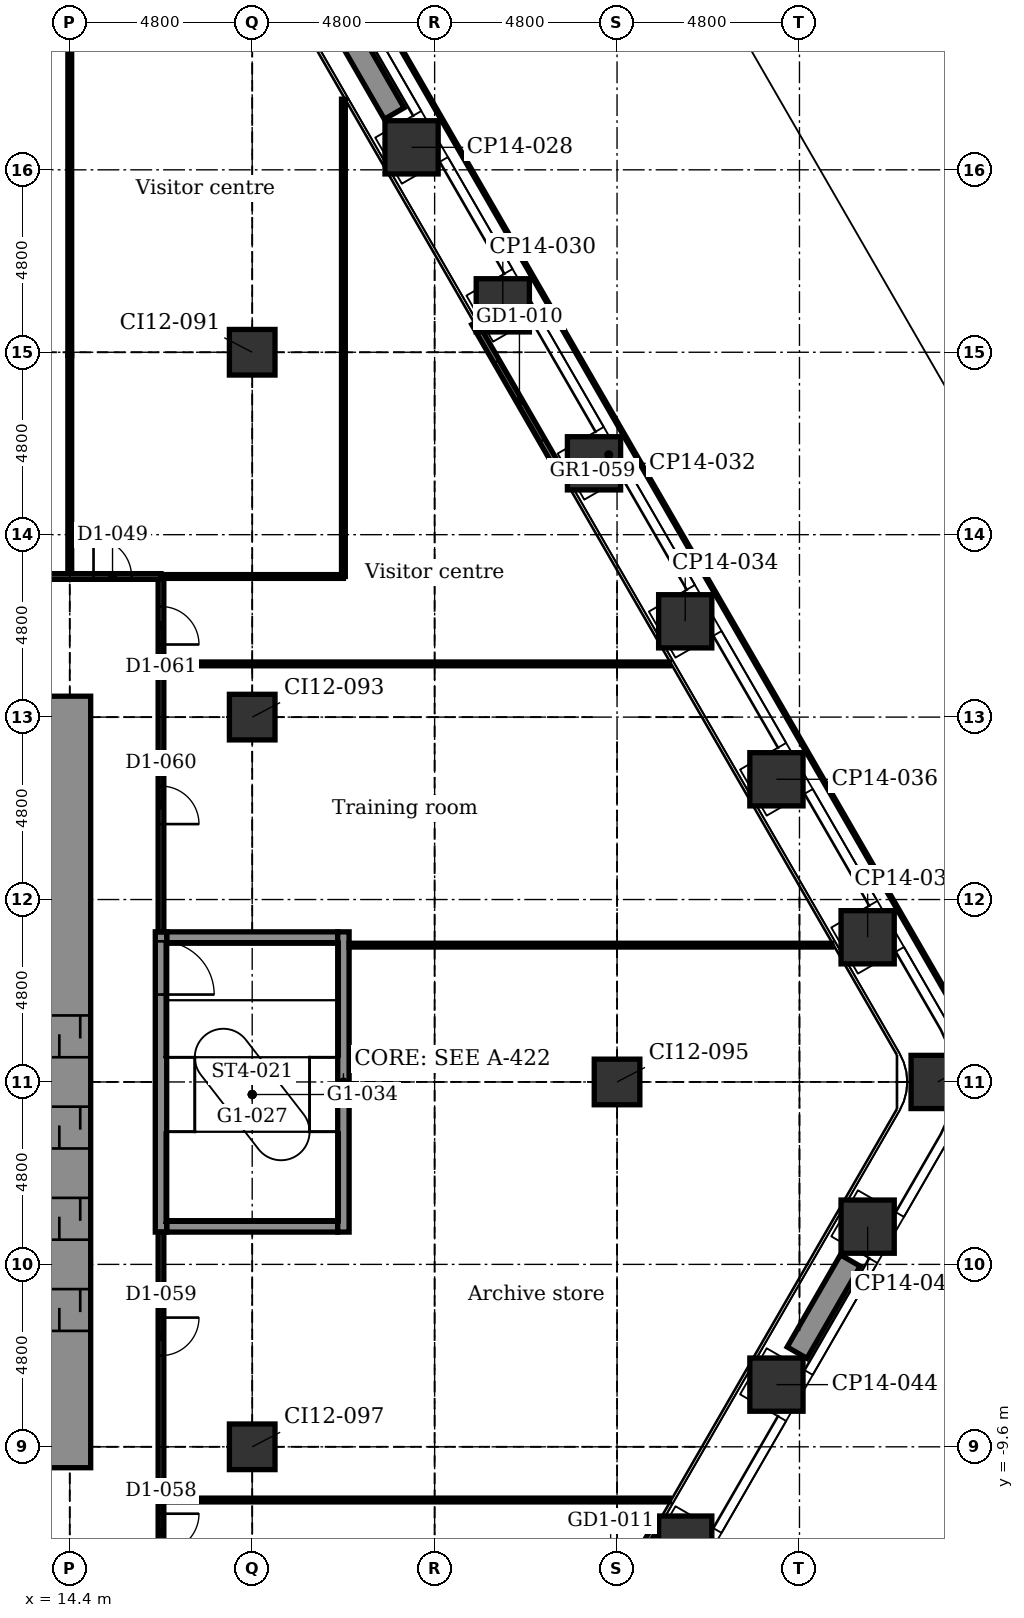
"""IFC4 building model, lengths in metres.
Left out: names, types, materials, properties, quantities, classifications, styles, units other than length and angle.
Written with IfcOpenShell. Run it as: python <this file> out.ifc"""

import sys

from ifc_helpers import new_model, si_unit, direction, frame, frame_2d, origin, origin_2d, place, context, subcontext, project, spatial, rectangle, extrude, element, fill, save


model = new_model("IFC4")
c1 = context("Model", 3, precision=1e-05, world=origin(), true_north=direction((0.0, 1.0)))
c2 = subcontext(c1, "Body", "Model", "MODEL_VIEW")
j1 = project(units=[si_unit("LENGTHUNIT", "METRE"), si_unit("PLANEANGLEUNIT", "RADIAN")], contexts=[c1])
p1 = place(None, origin())
s1 = spatial("IfcSite", under=j1, at=p1, CompositionType="ELEMENT")
p2 = place(p1, origin())
s2 = spatial("IfcBuilding", under=s1, at=p2, CompositionType="ELEMENT")
p3 = place(p2, frame((0.0, 0.0, 17.4)))
s3 = spatial("IfcBuildingStorey", under=s2, at=p3, CompositionType="ELEMENT", Elevation=17.4)
for number, where, z_axis, x_axis in (
    (1, (23.394, 24.592, -0.25), (0.0, 0.0, 1.0), (0.866, 0.5, 0.0)),
    (2, (25.794, 20.435, -0.25), (0.0, 0.0, 1.0), (0.866, 0.5, 0.0)),
    (3, (28.194, 16.278, -0.25), (0.0, 0.0, 1.0), (0.866, 0.5, 0.0)),
    (4, (30.594, 12.121, -0.25), (0.0, 0.0, 1.0), (0.866, 0.5, 0.0)),
    (5, (32.994, 7.964, -0.25), (0.0, 0.0, 1.0), (0.866, 0.5, 0.0)),
    (6, (35.394, 3.807, -0.25), (0.0, 0.0, 1.0), (0.866, 0.5, 0.0)),
    (7, (37.236, 0.0, -0.25), (0.0, 0.0, 1.0), (1.0, 0.0, 0.0)),
    (8, (35.394, -3.807, -0.25), (0.0, 0.0, 1.0), (0.5, 0.866, 0.0)),
    (9, (32.994, -7.964, -0.25), (0.0, 0.0, 1.0), (0.5, 0.866, 0.0)),
    (10, (30.594, -12.121, -0.25), (0.0, 0.0, 1.0), (0.5, 0.866, 0.0)),
):
    element("IfcColumn", number, at=place(p3, frame(where, z_axis=z_axis, x_axis=x_axis)), inside=s3, PredefinedType="COLUMN", context=c2, shape_type="SweptSolid", body=[
        extrude(rectangle(XDim=1.4, YDim=1.4, at=origin_2d()), origin(), (0.0, 0.0, 1.0), 5.0),
    ])
for number, where, z_axis, x_axis in (
    (11, (19.2, -9.6, -0.25), (0.0, 0.0, 1.0), (1.0, 0.0, 0.0)),
    (12, (19.2, 9.6, -0.25), (0.0, 0.0, 1.0), (1.0, 0.0, 0.0)),
    (13, (19.2, 19.2, -0.25), (0.0, 0.0, 1.0), (1.0, 0.0, 0.0)),
    (14, (28.8, 0.0, -0.25), (0.0, 0.0, 1.0), (1.0, 0.0, 0.0)),
):
    element("IfcColumn", number, at=place(p3, frame(where, z_axis=z_axis, x_axis=x_axis)), inside=s3, PredefinedType="COLUMN", context=c2, shape_type="SweptSolid", body=[
        extrude(rectangle(XDim=1.2, YDim=1.2, at=origin_2d()), origin(), (0.0, 0.0, 1.0), 5.0),
    ])
for number, where, z_axis, x_axis in (
    (15, (16.95, -3.8, -0.25), (0.0, 0.0, 1.0), (1.0, 0.0, 0.0)),
    (16, (16.95, 3.8, -0.25), (0.0, 0.0, 1.0), (1.0, 0.0, 0.0)),
):
    element("IfcWall", number, at=place(p3, frame(where, z_axis=z_axis, x_axis=x_axis)), inside=s3, PredefinedType="STANDARD", context=c2, shape_type="SweptSolid", body=[
        extrude(rectangle(XDim=4.5, YDim=0.3, at=frame_2d((2.25, 0.0))), origin(), (0.0, 0.0, 1.0), 5.0),
    ])
p4 = place(p3, frame((14.4, -10.15, -0.25), z_axis=(0.0, 0.0, 1.0), x_axis=(0.0, 1.0, 0.0)))
e17 = element("IfcWall", 17, at=p4, inside=s3, PredefinedType="SHEAR", context=c2, shape_type="SweptSolid", body=[
    extrude(rectangle(XDim=20.3, YDim=1.1, at=frame_2d((10.15, 0.0))), origin(), (0.0, 0.0, 1.0), 5.0),
])
p5 = place(p4, frame((3.6, 0.0, 0.25)))
e18 = element("IfcOpeningElement", 18, at=p5, cuts=e17, PredefinedType="OPENING", context=c2, shape_type="SweptSolid", body=[
    extrude(rectangle(XDim=1.1, YDim=2.1, at=frame_2d((0.55, 1.05))), frame((0.0, 0.56, 0.0), z_axis=(0.0, -1.0, 0.0), x_axis=(1.0, 0.0, 0.0)), (0.0, 0.0, 1.0), 1.12),
])
p6 = place(p4, frame((6.0, 0.0, 0.25)))
e19 = element("IfcOpeningElement", 19, at=p6, cuts=e17, PredefinedType="OPENING", context=c2, shape_type="SweptSolid", body=[
    extrude(rectangle(XDim=1.1, YDim=2.1, at=frame_2d((0.55, 1.05))), frame((0.0, 0.56, 0.0), z_axis=(0.0, -1.0, 0.0), x_axis=(1.0, 0.0, 0.0)), (0.0, 0.0, 1.0), 1.12),
])
p7 = place(p4, frame((8.4, 0.0, 0.25)))
e20 = element("IfcOpeningElement", 20, at=p7, cuts=e17, PredefinedType="OPENING", context=c2, shape_type="SweptSolid", body=[
    extrude(rectangle(XDim=1.1, YDim=2.1, at=frame_2d((0.55, 1.05))), frame((0.0, 0.56, 0.0), z_axis=(0.0, -1.0, 0.0), x_axis=(1.0, 0.0, 0.0)), (0.0, 0.0, 1.0), 1.12),
])
p8 = place(p4, frame((10.8, 0.0, 0.25)))
e21 = element("IfcOpeningElement", 21, at=p8, cuts=e17, PredefinedType="OPENING", context=c2, shape_type="SweptSolid", body=[
    extrude(rectangle(XDim=1.1, YDim=2.1, at=frame_2d((0.55, 1.05))), frame((0.0, 0.56, 0.0), z_axis=(0.0, -1.0, 0.0), x_axis=(1.0, 0.0, 0.0)), (0.0, 0.0, 1.0), 1.12),
])
p9 = place(p3, frame((16.8, -3.95, -0.25), z_axis=(0.0, 0.0, 1.0), x_axis=(0.0, 1.0, 0.0)))
e22 = element("IfcWall", 22, at=p9, inside=s3, PredefinedType="STANDARD", context=c2, shape_type="SweptSolid", body=[
    extrude(rectangle(XDim=7.9, YDim=0.3, at=frame_2d((3.95, 0.0))), origin(), (0.0, 0.0, 1.0), 5.0),
])
p10 = place(p9, frame((6.25, 0.0, 0.25)))
e23 = element("IfcOpeningElement", 23, at=p10, cuts=e22, PredefinedType="OPENING", context=c2, shape_type="SweptSolid", body=[
    extrude(rectangle(XDim=1.4, YDim=2.1, at=frame_2d((0.7, 1.05))), frame((0.0, 0.16, 0.0), z_axis=(0.0, -1.0, 0.0), x_axis=(1.0, 0.0, 0.0)), (0.0, 0.0, 1.0), 0.32),
])
p11 = place(p3, frame((21.6, -3.95, -0.25), z_axis=(0.0, 0.0, 1.0), x_axis=(0.0, 1.0, 0.0)))
e24 = element("IfcWall", 24, at=p11, inside=s3, PredefinedType="STANDARD", context=c2, shape_type="SweptSolid", body=[
    extrude(rectangle(XDim=7.9, YDim=0.3, at=frame_2d((3.95, 0.0))), origin(), (0.0, 0.0, 1.0), 5.0),
])
p12 = place(p3, frame((25.047, 19.969, 0.0), z_axis=(0.0, 0.0, 1.0), x_axis=(0.5000167099, -0.866015756104, 0.0)))
e25 = element("IfcWall", 25, at=p12, inside=s3, PredefinedType="PARTITIONING", context=c2, shape_type="SweptSolid", body=[
    extrude(rectangle(XDim=4.74, YDim=0.16, at=frame_2d((2.37, 0.0))), origin(), (0.0, 0.0, 1.0), 4.75),
])
p13 = place(p12, frame((1.17, 0.0, 0.0)))
e26 = element("IfcOpeningElement", 26, at=p13, cuts=e25, PredefinedType="OPENING", context=c2, shape_type="SweptSolid", body=[
    extrude(rectangle(XDim=2.4, YDim=2.4, at=frame_2d((1.2, 1.2))), frame((0.0, 0.09, 0.0), z_axis=(0.0, -1.0, 0.0), x_axis=(1.0, 0.0, 0.0)), (0.0, 0.0, 1.0), 0.18),
])
p14 = place(p3, frame((29.817, -11.707, 0.0), z_axis=(0.0, 0.0, 1.0), x_axis=(-0.499978080042, -0.866038058908, 0.0)))
e27 = element("IfcWall", 27, at=p14, inside=s3, PredefinedType="PARTITIONING", context=c2, shape_type="SweptSolid", body=[
    extrude(rectangle(XDim=4.74, YDim=0.16, at=frame_2d((2.37, 0.0))), origin(), (0.0, 0.0, 1.0), 4.75),
])
p15 = place(p14, frame((1.17, 0.0, 0.0)))
e28 = element("IfcOpeningElement", 28, at=p15, cuts=e27, PredefinedType="OPENING", context=c2, shape_type="SweptSolid", body=[
    extrude(rectangle(XDim=2.4, YDim=2.4, at=frame_2d((1.2, 1.2))), frame((0.0, 0.09, 0.0), z_axis=(0.0, -1.0, 0.0), x_axis=(1.0, 0.0, 0.0)), (0.0, 0.0, 1.0), 0.18),
])
for number, where, z_axis, x_axis in (
    (29, (21.537, 27.907, 0.0), (0.0, 0.0, 1.0), (0.5, -0.866, 0.0)),
    (30, (34.937, -4.698, 0.0), (0.0, 0.0, 1.0), (-0.5, -0.866, 0.0)),
):
    element("IfcWall", number, at=place(p3, frame(where, z_axis=z_axis, x_axis=x_axis)), inside=s3, PredefinedType="USERDEFINED", context=c2, shape_type="SweptSolid", body=[
        extrude(rectangle(XDim=2.8, YDim=0.6, at=frame_2d((1.4, 0.0))), origin(), (0.0, 0.0, 1.0), 0.7),
    ])
p16 = place(p3, frame((21.6, 13.3, 0.0), z_axis=(0.0, 0.0, 1.0), x_axis=(0.0, 1.0, 0.0)))
e31 = element("IfcWall", 31, at=p16, inside=s3, PredefinedType="PARTITIONING", context=c2, shape_type="SweptSolid", body=[
    extrude(rectangle(XDim=12.558, YDim=0.1, at=frame_2d((6.279, 0.0))), origin(), (0.0, 0.0, 1.0), 4.75),
])
p17 = place(p3, frame((16.8, -13.0, 0.0), z_axis=(0.0, 0.0, 1.0), x_axis=(0.0, 1.0, 0.0)))
e32 = element("IfcWall", 32, at=p17, inside=s3, PredefinedType="PARTITIONING", context=c2, shape_type="SweptSolid", body=[
    extrude(rectangle(XDim=9.05, YDim=0.15, at=frame_2d((4.525, 0.0))), origin(), (0.0, 0.0, 1.0), 4.75),
])
p18 = place(p17, frame((0.64, 0.0, 0.0)))
e33 = element("IfcOpeningElement", 33, at=p18, cuts=e32, PredefinedType="OPENING", context=c2, shape_type="SweptSolid", body=[
    extrude(rectangle(XDim=1.0, YDim=2.1, at=frame_2d((0.5, 1.05))), frame((0.0, 0.085, 0.0), z_axis=(0.0, -1.0, 0.0), x_axis=(1.0, 0.0, 0.0)), (0.0, 0.0, 1.0), 0.17),
])
p19 = place(p17, frame((5.8, 0.0, 0.0)))
e34 = element("IfcOpeningElement", 34, at=p19, cuts=e32, PredefinedType="OPENING", context=c2, shape_type="SweptSolid", body=[
    extrude(rectangle(XDim=1.0, YDim=2.1, at=frame_2d((0.5, 1.05))), frame((0.0, 0.085, 0.0), z_axis=(0.0, -1.0, 0.0), x_axis=(1.0, 0.0, 0.0)), (0.0, 0.0, 1.0), 0.17),
])
p20 = place(p3, frame((16.8, 3.95, 0.0), z_axis=(0.0, 0.0, 1.0), x_axis=(0.0, 1.0, 0.0)))
e35 = element("IfcWall", 35, at=p20, inside=s3, PredefinedType="PARTITIONING", context=c2, shape_type="SweptSolid", body=[
    extrude(rectangle(XDim=9.35, YDim=0.15, at=frame_2d((4.675, 0.0))), origin(), (0.0, 0.0, 1.0), 4.75),
])
p21 = place(p20, frame((2.835, 0.0, 0.0)))
e36 = element("IfcOpeningElement", 36, at=p21, cuts=e35, PredefinedType="OPENING", context=c2, shape_type="SweptSolid", body=[
    extrude(rectangle(XDim=1.0, YDim=2.1, at=frame_2d((0.5, 1.05))), frame((0.0, 0.085, 0.0), z_axis=(0.0, -1.0, 0.0), x_axis=(1.0, 0.0, 0.0)), (0.0, 0.0, 1.0), 0.17),
])
p22 = place(p20, frame((7.56, 0.0, 0.0)))
e37 = element("IfcOpeningElement", 37, at=p22, cuts=e35, PredefinedType="OPENING", context=c2, shape_type="SweptSolid", body=[
    extrude(rectangle(XDim=1.0, YDim=2.1, at=frame_2d((0.5, 1.05))), frame((0.0, 0.085, 0.0), z_axis=(0.0, -1.0, 0.0), x_axis=(1.0, 0.0, 0.0)), (0.0, 0.0, 1.0), 0.17),
])
p23 = place(p3, frame((14.4, 19.113, 0.0), z_axis=(0.0, 0.0, 1.0), x_axis=(0.0, 1.0, 0.0)))
e38 = element("IfcWall", 38, at=p23, inside=s3, PredefinedType="PARTITIONING", context=c2, shape_type="SweptSolid", body=[
    extrude(rectangle(XDim=12.472, YDim=0.1, at=frame_2d((6.236, 0.0))), origin(), (0.0, 0.0, 1.0), 4.066),
])
p24 = place(p3, frame((14.4, 13.3, 0.0), z_axis=(0.0, 0.0, 1.0), x_axis=(0.0, 1.0, 0.0)))
e39 = element("IfcWall", 39, at=p24, inside=s3, PredefinedType="PARTITIONING", context=c2, shape_type="SweptSolid", body=[
    extrude(rectangle(XDim=5.813, YDim=0.1, at=frame_2d((2.906, 0.0))), origin(), (0.0, 0.0, 1.0), 4.293),
])
p25 = place(p3, frame((16.8, -11.0, 0.0), z_axis=(0.0, 0.0, 1.0), x_axis=(1.0, 0.0, 0.0)))
e40 = element("IfcWall", 40, at=p25, inside=s3, PredefinedType="PARTITIONING", context=c2, shape_type="SweptSolid", body=[
    extrude(rectangle(XDim=13.378, YDim=0.1, at=frame_2d((6.689, 0.0))), origin(), (0.0, 0.0, 1.0), 4.75),
])
p26 = place(p3, frame((21.75, 3.6, 0.0), z_axis=(0.0, 0.0, 1.0), x_axis=(1.0, 0.0, 0.0)))
e41 = element("IfcWall", 41, at=p26, inside=s3, PredefinedType="PARTITIONING", context=c2, shape_type="SweptSolid", body=[
    extrude(rectangle(XDim=12.701, YDim=0.1, at=frame_2d((6.351, 0.0))), origin(), (0.0, 0.0, 1.0), 4.75),
])
p27 = place(p3, frame((16.8, 11.0, 0.0), z_axis=(0.0, 0.0, 1.0), x_axis=(1.0, 0.0, 0.0)))
e42 = element("IfcWall", 42, at=p27, inside=s3, PredefinedType="PARTITIONING", context=c2, shape_type="SweptSolid", body=[
    extrude(rectangle(XDim=13.378, YDim=0.1, at=frame_2d((6.689, 0.0))), origin(), (0.0, 0.0, 1.0), 4.75),
])
p28 = place(p3, frame((16.8, 13.3, 0.0), z_axis=(0.0, 0.0, 1.0), x_axis=(1.0, 0.0, 0.0)))
e43 = element("IfcWall", 43, at=p28, inside=s3, PredefinedType="PARTITIONING", context=c2, shape_type="SweptSolid", body=[
    extrude(rectangle(XDim=4.8, YDim=0.1, at=frame_2d((2.4, 0.0))), origin(), (0.0, 0.0, 1.0), 4.75),
])
p29 = place(p3, frame((-16.8, 13.3, 0.0), z_axis=(0.0, 0.0, 1.0), x_axis=(1.0, 0.0, 0.0)))
e44 = element("IfcWall", 44, at=p29, inside=s3, PredefinedType="PARTITIONING", context=c2, shape_type="SweptSolid", body=[
    extrude(rectangle(XDim=33.6, YDim=0.15, at=frame_2d((16.8, 0.0))), origin(), (0.0, 0.0, 1.0), 4.75),
])
p30 = place(p29, frame((1.9, 0.0, 0.0)))
e45 = element("IfcOpeningElement", 45, at=p30, cuts=e44, PredefinedType="OPENING", context=c2, shape_type="SweptSolid", body=[
    extrude(rectangle(XDim=1.0, YDim=2.1, at=frame_2d((0.5, 1.05))), frame((0.0, 0.085, 0.0), z_axis=(0.0, -1.0, 0.0), x_axis=(1.0, 0.0, 0.0)), (0.0, 0.0, 1.0), 0.17),
])
p31 = place(p29, frame((5.375, 0.0, 0.0)))
e46 = element("IfcOpeningElement", 46, at=p31, cuts=e44, PredefinedType="OPENING", context=c2, shape_type="SweptSolid", body=[
    extrude(rectangle(XDim=1.0, YDim=2.1, at=frame_2d((0.5, 1.05))), frame((0.0, 0.085, 0.0), z_axis=(0.0, -1.0, 0.0), x_axis=(1.0, 0.0, 0.0)), (0.0, 0.0, 1.0), 0.17),
])
p32 = place(p29, frame((9.825, 0.0, 0.0)))
e47 = element("IfcOpeningElement", 47, at=p32, cuts=e44, PredefinedType="OPENING", context=c2, shape_type="SweptSolid", body=[
    extrude(rectangle(XDim=1.0, YDim=2.1, at=frame_2d((0.5, 1.05))), frame((0.0, 0.085, 0.0), z_axis=(0.0, -1.0, 0.0), x_axis=(1.0, 0.0, 0.0)), (0.0, 0.0, 1.0), 0.17),
])
p33 = place(p29, frame((14.335, 0.0, 0.0)))
e48 = element("IfcOpeningElement", 48, at=p33, cuts=e44, PredefinedType="OPENING", context=c2, shape_type="SweptSolid", body=[
    extrude(rectangle(XDim=1.0, YDim=2.1, at=frame_2d((0.5, 1.05))), frame((0.0, 0.085, 0.0), z_axis=(0.0, -1.0, 0.0), x_axis=(1.0, 0.0, 0.0)), (0.0, 0.0, 1.0), 0.17),
])
p34 = place(p29, frame((18.185, 0.0, 0.0)))
e49 = element("IfcOpeningElement", 49, at=p34, cuts=e44, PredefinedType="OPENING", context=c2, shape_type="SweptSolid", body=[
    extrude(rectangle(XDim=1.0, YDim=2.1, at=frame_2d((0.5, 1.05))), frame((0.0, 0.085, 0.0), z_axis=(0.0, -1.0, 0.0), x_axis=(1.0, 0.0, 0.0)), (0.0, 0.0, 1.0), 0.17),
])
p35 = place(p29, frame((27.575, 0.0, 0.0)))
e50 = element("IfcOpeningElement", 50, at=p35, cuts=e44, PredefinedType="OPENING", context=c2, shape_type="SweptSolid", body=[
    extrude(rectangle(XDim=1.0, YDim=2.1, at=frame_2d((0.5, 1.05))), frame((0.0, 0.085, 0.0), z_axis=(0.0, -1.0, 0.0), x_axis=(1.0, 0.0, 0.0)), (0.0, 0.0, 1.0), 0.17),
])
p36 = place(p29, frame((31.825, 0.0, 0.0)))
e51 = element("IfcOpeningElement", 51, at=p36, cuts=e44, PredefinedType="OPENING", context=c2, shape_type="SweptSolid", body=[
    extrude(rectangle(XDim=1.0, YDim=2.1, at=frame_2d((0.5, 1.05))), frame((0.0, 0.085, 0.0), z_axis=(0.0, -1.0, 0.0), x_axis=(1.0, 0.0, 0.0)), (0.0, 0.0, 1.0), 0.17),
])
p37 = place(p29, frame((23.55, 0.0, 0.0)))
e52 = element("IfcOpeningElement", 52, at=p37, cuts=e44, PredefinedType="OPENING", context=c2, shape_type="SweptSolid", body=[
    extrude(rectangle(XDim=0.9, YDim=2.1, at=frame_2d((0.45, 1.05))), frame((0.0, 0.085, 0.0), z_axis=(0.0, -1.0, 0.0), x_axis=(1.0, 0.0, 0.0)), (0.0, 0.0, 1.0), 0.17),
])
p38 = place(p29, frame((20.55, 0.0, 0.0)))
e53 = element("IfcOpeningElement", 53, at=p38, cuts=e44, PredefinedType="OPENING", context=c2, shape_type="SweptSolid", body=[
    extrude(rectangle(XDim=0.9, YDim=2.1, at=frame_2d((0.45, 1.05))), frame((0.0, 0.085, 0.0), z_axis=(0.0, -1.0, 0.0), x_axis=(1.0, 0.0, 0.0)), (0.0, 0.0, 1.0), 0.17),
])
p39 = place(p13, origin())
e54 = element("IfcDoor", 54, at=p39, inside=s3, OperationType="DOUBLE_DOOR_SLIDING", PredefinedType="DOOR", context=c2, shape_type="SweptSolid", body=[
    extrude(rectangle(XDim=2.4, YDim=2.4, at=frame_2d((1.2, 1.2))), frame((0.0, 0.025, 0.0), z_axis=(0.0, -1.0, 0.0), x_axis=(1.0, 0.0, 0.0)), (0.0, 0.0, 1.0), 0.05),
])
fill(e26, e54)
p40 = place(p36, origin())
e55 = element("IfcDoor", 55, at=p40, inside=s3, OperationType="SINGLE_SWING_LEFT", PredefinedType="DOOR", context=c2, shape_type="SweptSolid", body=[
    extrude(rectangle(XDim=1.0, YDim=2.1, at=frame_2d((0.5, 1.05))), frame((0.0, 0.025, 0.0), z_axis=(0.0, -1.0, 0.0), x_axis=(1.0, 0.0, 0.0)), (0.0, 0.0, 1.0), 0.05),
])
fill(e51, e55)
p41 = place(p18, frame((1.0, 0.0, 0.0), z_axis=(0.0, 0.0, 1.0), x_axis=(-1.0, 0.0, 0.0)))
e56 = element("IfcDoor", 56, at=p41, inside=s3, OperationType="SINGLE_SWING_RIGHT", PredefinedType="DOOR", context=c2, shape_type="SweptSolid", body=[
    extrude(rectangle(XDim=1.0, YDim=2.1, at=frame_2d((0.5, 1.05))), frame((0.0, 0.025, 0.0), z_axis=(0.0, -1.0, 0.0), x_axis=(1.0, 0.0, 0.0)), (0.0, 0.0, 1.0), 0.05),
])
fill(e33, e56)
p42 = place(p19, frame((1.0, 0.0, 0.0), z_axis=(0.0, 0.0, 1.0), x_axis=(-1.0, 0.0, 0.0)))
e57 = element("IfcDoor", 57, at=p42, inside=s3, OperationType="SINGLE_SWING_RIGHT", PredefinedType="DOOR", context=c2, shape_type="SweptSolid", body=[
    extrude(rectangle(XDim=1.0, YDim=2.1, at=frame_2d((0.5, 1.05))), frame((0.0, 0.025, 0.0), z_axis=(0.0, -1.0, 0.0), x_axis=(1.0, 0.0, 0.0)), (0.0, 0.0, 1.0), 0.05),
])
fill(e34, e57)
p43 = place(p21, frame((1.0, 0.0, 0.0), z_axis=(0.0, 0.0, 1.0), x_axis=(-1.0, 0.0, 0.0)))
e58 = element("IfcDoor", 58, at=p43, inside=s3, OperationType="SINGLE_SWING_LEFT", PredefinedType="DOOR", context=c2, shape_type="SweptSolid", body=[
    extrude(rectangle(XDim=1.0, YDim=2.1, at=frame_2d((0.5, 1.05))), frame((0.0, 0.025, 0.0), z_axis=(0.0, -1.0, 0.0), x_axis=(1.0, 0.0, 0.0)), (0.0, 0.0, 1.0), 0.05),
])
fill(e36, e58)
p44 = place(p22, frame((1.0, 0.0, 0.0), z_axis=(0.0, 0.0, 1.0), x_axis=(-1.0, 0.0, 0.0)))
e59 = element("IfcDoor", 59, at=p44, inside=s3, OperationType="SINGLE_SWING_LEFT", PredefinedType="DOOR", context=c2, shape_type="SweptSolid", body=[
    extrude(rectangle(XDim=1.0, YDim=2.1, at=frame_2d((0.5, 1.05))), frame((0.0, 0.025, 0.0), z_axis=(0.0, -1.0, 0.0), x_axis=(1.0, 0.0, 0.0)), (0.0, 0.0, 1.0), 0.05),
])
fill(e37, e59)
p45 = place(p5, origin())
e60 = element("IfcDoor", 60, at=p45, inside=s3, OperationType="DOUBLE_DOOR_SLIDING", PredefinedType="DOOR", context=c2, shape_type="SweptSolid", body=[
    extrude(rectangle(XDim=1.1, YDim=2.1, at=frame_2d((0.55, 1.05))), frame((0.0, 0.025, 0.0), z_axis=(0.0, -1.0, 0.0), x_axis=(1.0, 0.0, 0.0)), (0.0, 0.0, 1.0), 0.05),
])
fill(e18, e60)
p46 = place(p6, origin())
e61 = element("IfcDoor", 61, at=p46, inside=s3, OperationType="DOUBLE_DOOR_SLIDING", PredefinedType="DOOR", context=c2, shape_type="SweptSolid", body=[
    extrude(rectangle(XDim=1.1, YDim=2.1, at=frame_2d((0.55, 1.05))), frame((0.0, 0.025, 0.0), z_axis=(0.0, -1.0, 0.0), x_axis=(1.0, 0.0, 0.0)), (0.0, 0.0, 1.0), 0.05),
])
fill(e19, e61)
p47 = place(p7, origin())
e62 = element("IfcDoor", 62, at=p47, inside=s3, OperationType="DOUBLE_DOOR_SLIDING", PredefinedType="DOOR", context=c2, shape_type="SweptSolid", body=[
    extrude(rectangle(XDim=1.1, YDim=2.1, at=frame_2d((0.55, 1.05))), frame((0.0, 0.025, 0.0), z_axis=(0.0, -1.0, 0.0), x_axis=(1.0, 0.0, 0.0)), (0.0, 0.0, 1.0), 0.05),
])
fill(e20, e62)
p48 = place(p8, origin())
e63 = element("IfcDoor", 63, at=p48, inside=s3, OperationType="DOUBLE_DOOR_SLIDING", PredefinedType="DOOR", context=c2, shape_type="SweptSolid", body=[
    extrude(rectangle(XDim=1.1, YDim=2.1, at=frame_2d((0.55, 1.05))), frame((0.0, 0.025, 0.0), z_axis=(0.0, -1.0, 0.0), x_axis=(1.0, 0.0, 0.0)), (0.0, 0.0, 1.0), 0.05),
])
fill(e21, e63)
p49 = place(p10, frame((1.4, 0.0, 0.0), z_axis=(0.0, 0.0, 1.0), x_axis=(-1.0, 0.0, 0.0)))
e64 = element("IfcDoor", 64, at=p49, inside=s3, OperationType="SINGLE_SWING_LEFT", PredefinedType="DOOR", context=c2, shape_type="SweptSolid", body=[
    extrude(rectangle(XDim=1.4, YDim=2.1, at=frame_2d((0.7, 1.05))), frame((0.0, 0.025, 0.0), z_axis=(0.0, -1.0, 0.0), x_axis=(1.0, 0.0, 0.0)), (0.0, 0.0, 1.0), 0.05),
])
fill(e23, e64)
save(model, sys.argv[1])
